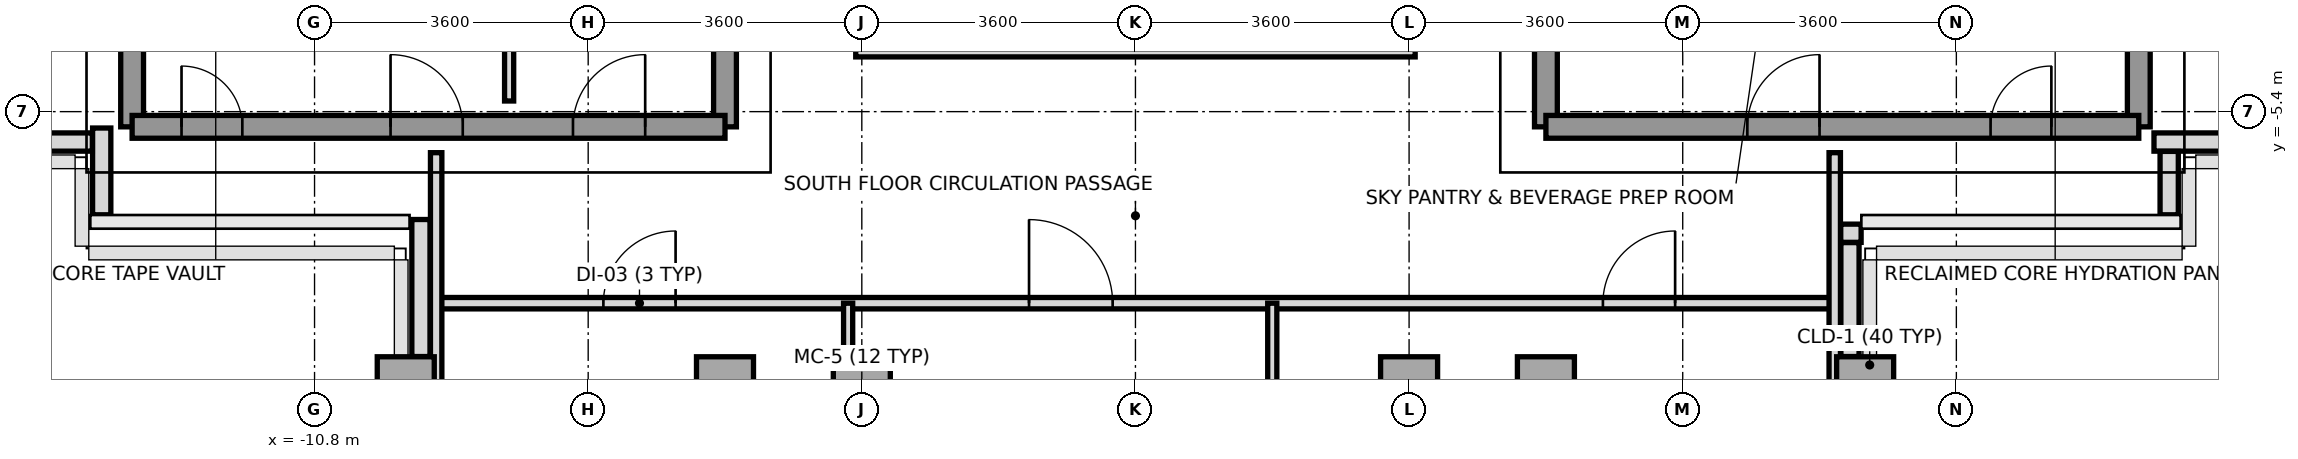
"""IFC4 building model, lengths in metres.
Left out: names, types, materials, properties, quantities, classifications, styles, units other than length and angle.
Written with IfcOpenShell. Run it as: python <this file> out.ifc"""

import sys

from ifc_helpers import new_model, si_unit, direction, frame, frame_2d, origin, origin_2d, place, context, subcontext, project, spatial, rectangle, extrude, source, transform, mapped, element, fill, save


model = new_model("IFC4")
c1 = context("Model", 3, precision=1e-05, world=origin(), true_north=direction((0.0, 1.0)))
c2 = subcontext(c1, "Body", "Model", "MODEL_VIEW")
j1 = project(units=[si_unit("LENGTHUNIT", "METRE"), si_unit("PLANEANGLEUNIT", "RADIAN")], contexts=[c1])
p1 = place(None, origin())
s1 = spatial("IfcSite", under=j1, at=p1, CompositionType="ELEMENT")
p2 = place(p1, origin())
s2 = spatial("IfcBuilding", under=s1, at=p2, CompositionType="ELEMENT")
p3 = place(p2, frame((0.0, 0.0, 255.6)))
s3 = spatial("IfcBuildingStorey", under=s2, at=p3, CompositionType="ELEMENT", Elevation=255.6)
m1 = source(origin(), c2, "Body", "SweptSolid", [
    extrude(rectangle(XDim=0.75, YDim=0.75, at=origin_2d()), origin(), (0.0, 0.0, 1.0), 3.01),
])
for number, where, z_axis, x_axis in (
    (1, (-9.6, -9.0, 0.0), (0.0, 0.0, 1.0), (1.0, 0.0, 0.0)),
    (2, (-5.4, -9.0, 0.0), (0.0, 0.0, 1.0), (1.0, 0.0, 0.0)),
    (3, (-3.6, -9.0, 0.0), (0.0, 0.0, 1.0), (1.0, 0.0, 0.0)),
    (4, (3.6, -9.0, 0.0), (0.0, 0.0, 1.0), (1.0, 0.0, 0.0)),
    (5, (5.4, -9.0, 0.0), (0.0, 0.0, 1.0), (1.0, 0.0, 0.0)),
    (6, (9.6, -9.0, 0.0), (0.0, 0.0, 1.0), (1.0, 0.0, 0.0)),
):
    element("IfcColumn", number, at=place(p3, frame(where, z_axis=z_axis, x_axis=x_axis)), inside=s3, PredefinedType="COLUMN", context=c2, shape_type="MappedRepresentation", body=[
        mapped(m1, transform((0.0, 0.0, 0.0), x_axis=(1.0, 0.0, 0.0), y_axis=(0.0, 1.0, 0.0), z_axis=(0.0, 0.0, 1.0), scale=1.0)),
    ])
p4 = place(p3, frame((14.677, -5.8, 0.0), z_axis=(0.0, 0.0, 1.0), x_axis=(-1.0, 0.0, 0.0)))
e7 = element("IfcWall", 7, at=p4, inside=s3, PredefinedType="PARAPET", context=c2, shape_type="SweptSolid", body=[
    extrude(rectangle(XDim=1.277, YDim=0.24, at=frame_2d((0.639, 0.0))), origin(), (0.0, 0.0, 1.0), 1.15),
])
p5 = place(p3, frame((13.6, -5.923, 0.0), z_axis=(0.0, 0.0, 1.0), x_axis=(0.0, -1.0, 0.0)))
e8 = element("IfcWall", 8, at=p5, inside=s3, PredefinedType="PARAPET", context=c2, shape_type="SweptSolid", body=[
    extrude(rectangle(XDim=0.834, YDim=0.24, at=frame_2d((0.417, 0.0))), origin(), (0.0, 0.0, 1.0), 1.15),
])
p6 = place(p3, frame((9.547, -7.0, 0.0), z_axis=(0.0, 0.0, 1.0), x_axis=(-1.0, 0.0, 0.0)))
e9 = element("IfcWall", 9, at=p6, inside=s3, PredefinedType="PARAPET", context=c2, shape_type="SweptSolid", body=[
    extrude(rectangle(XDim=0.269, YDim=0.24, at=frame_2d((0.135, 0.0))), origin(), (0.0, 0.0, 1.0), 1.15),
])
p7 = place(p3, frame((9.4, -7.123, 0.0), z_axis=(0.0, 0.0, 1.0), x_axis=(0.0, -1.0, 0.0)))
e10 = element("IfcWall", 10, at=p7, inside=s3, PredefinedType="PARAPET", context=c2, shape_type="SweptSolid", body=[
    extrude(rectangle(XDim=1.499, YDim=0.24, at=frame_2d((0.75, 0.0))), origin(), (0.0, 0.0, 1.0), 1.15),
])
p8 = place(p3, frame((-9.4, -8.622, 0.0), z_axis=(0.0, 0.0, 1.0), x_axis=(0.0, 1.0, 0.0)))
e11 = element("IfcWall", 11, at=p8, inside=s3, PredefinedType="PARAPET", context=c2, shape_type="SweptSolid", body=[
    extrude(rectangle(XDim=1.803, YDim=0.24, at=frame_2d((0.901, 0.0))), origin(), (0.0, 0.0, 1.0), 1.15),
])
p9 = place(p3, frame((-13.6, -6.757, 0.0), z_axis=(0.0, 0.0, 1.0), x_axis=(0.0, 1.0, 0.0)))
e12 = element("IfcWall", 12, at=p9, inside=s3, PredefinedType="PARAPET", context=c2, shape_type="SweptSolid", body=[
    extrude(rectangle(XDim=1.142, YDim=0.24, at=frame_2d((0.571, 0.0))), origin(), (0.0, 0.0, 1.0), 1.15),
])
p10 = place(p3, frame((-13.723, -5.8, 0.0), z_axis=(0.0, 0.0, 1.0), x_axis=(-1.0, 0.0, 0.0)))
e13 = element("IfcWall", 13, at=p10, inside=s3, PredefinedType="PARAPET", context=c2, shape_type="SweptSolid", body=[
    extrude(rectangle(XDim=1.077, YDim=0.24, at=frame_2d((0.539, 0.0))), origin(), (0.0, 0.0, 1.0), 1.15),
])
p11 = place(p3, frame((-13.2, -5.6, 0.0), z_axis=(0.0, 0.0, 1.0), x_axis=(0.0, 1.0, 0.0)))
e14 = element("IfcWall", 14, at=p11, inside=s3, PredefinedType="SHEAR", context=c2, shape_type="SweptSolid", body=[
    extrude(rectangle(XDim=11.2, YDim=0.3, at=frame_2d((5.6, 0.0))), origin(), (0.0, 0.0, 1.0), 3.01),
])
p12 = place(p3, frame((-5.4, -5.6, 0.0), z_axis=(0.0, 0.0, 1.0), x_axis=(0.0, 1.0, 0.0)))
e15 = element("IfcWall", 15, at=p12, inside=s3, PredefinedType="SHEAR", context=c2, shape_type="SweptSolid", body=[
    extrude(rectangle(XDim=12.5, YDim=0.3, at=frame_2d((6.25, 0.0))), origin(), (0.0, 0.0, 1.0), 3.01),
])
p13 = place(p12, frame((4.55, 0.0, 0.0)))
e16 = element("IfcOpeningElement", 16, at=p13, cuts=e15, PredefinedType="OPENING", context=c2, shape_type="SweptSolid", body=[
    extrude(rectangle(XDim=1.2, YDim=2.2, at=frame_2d((0.6, 1.1))), frame((0.0, 0.16, 0.0), z_axis=(0.0, -1.0, 0.0), x_axis=(1.0, 0.0, 0.0)), (0.0, 0.0, 1.0), 0.32),
])
p14 = place(p12, frame((10.45, 0.0, 0.0)))
e17 = element("IfcOpeningElement", 17, at=p14, cuts=e15, PredefinedType="OPENING", context=c2, shape_type="SweptSolid", body=[
    extrude(rectangle(XDim=1.2, YDim=2.2, at=frame_2d((0.6, 1.1))), frame((0.0, 0.16, 0.0), z_axis=(0.0, -1.0, 0.0), x_axis=(1.0, 0.0, 0.0)), (0.0, 0.0, 1.0), 0.32),
])
p15 = place(p12, frame((6.86, 0.0, 0.0)))
e18 = element("IfcOpeningElement", 18, at=p15, cuts=e15, PredefinedType="OPENING", context=c2, shape_type="SweptSolid", body=[
    extrude(rectangle(XDim=0.8, YDim=2.1, at=frame_2d((0.4, 1.05))), frame((0.0, 0.16, 0.0), z_axis=(0.0, -1.0, 0.0), x_axis=(1.0, 0.0, 0.0)), (0.0, 0.0, 1.0), 0.32),
])
p16 = place(p12, frame((7.88, 0.0, 0.0)))
e19 = element("IfcOpeningElement", 19, at=p16, cuts=e15, PredefinedType="OPENING", context=c2, shape_type="SweptSolid", body=[
    extrude(rectangle(XDim=0.8, YDim=2.1, at=frame_2d((0.4, 1.05))), frame((0.0, 0.16, 0.0), z_axis=(0.0, -1.0, 0.0), x_axis=(1.0, 0.0, 0.0)), (0.0, 0.0, 1.0), 0.32),
])
p17 = place(p3, frame((-13.2, -5.6, 0.0), z_axis=(0.0, 0.0, 1.0), x_axis=(1.0, 0.0, 0.0)))
e20 = element("IfcWall", 20, at=p17, inside=s3, PredefinedType="SHEAR", context=c2, shape_type="SweptSolid", body=[
    extrude(rectangle(XDim=7.8, YDim=0.3, at=frame_2d((3.9, 0.0))), origin(), (0.0, 0.0, 1.0), 3.01),
])
p18 = place(p17, frame((0.65, 0.0, 0.0)))
e21 = element("IfcOpeningElement", 21, at=p18, cuts=e20, PredefinedType="OPENING", context=c2, shape_type="SweptSolid", body=[
    extrude(rectangle(XDim=0.8, YDim=2.1, at=frame_2d((0.4, 1.05))), frame((0.0, 0.16, 0.0), z_axis=(0.0, -1.0, 0.0), x_axis=(1.0, 0.0, 0.0)), (0.0, 0.0, 1.0), 0.32),
])
p19 = place(p17, frame((3.4, 0.0, 0.0)))
e22 = element("IfcOpeningElement", 22, at=p19, cuts=e20, PredefinedType="OPENING", context=c2, shape_type="SweptSolid", body=[
    extrude(rectangle(XDim=0.95, YDim=2.15, at=frame_2d((0.475, 1.075))), frame((0.0, 0.16, 0.0), z_axis=(0.0, -1.0, 0.0), x_axis=(1.0, 0.0, 0.0)), (0.0, 0.0, 1.0), 0.32),
])
p20 = place(p17, frame((5.8, 0.0, 0.0)))
e23 = element("IfcOpeningElement", 23, at=p20, cuts=e20, PredefinedType="OPENING", context=c2, shape_type="SweptSolid", body=[
    extrude(rectangle(XDim=0.95, YDim=2.15, at=frame_2d((0.475, 1.075))), frame((0.0, 0.16, 0.0), z_axis=(0.0, -1.0, 0.0), x_axis=(1.0, 0.0, 0.0)), (0.0, 0.0, 1.0), 0.32),
])
p21 = place(p3, frame((13.2, -5.6, 0.0), z_axis=(0.0, 0.0, 1.0), x_axis=(0.0, 1.0, 0.0)))
e24 = element("IfcWall", 24, at=p21, inside=s3, PredefinedType="SHEAR", context=c2, shape_type="SweptSolid", body=[
    extrude(rectangle(XDim=11.2, YDim=0.3, at=frame_2d((5.6, 0.0))), origin(), (0.0, 0.0, 1.0), 3.01),
])
p22 = place(p3, frame((5.4, -5.6, 0.0), z_axis=(0.0, 0.0, 1.0), x_axis=(0.0, 1.0, 0.0)))
e25 = element("IfcWall", 25, at=p22, inside=s3, PredefinedType="SHEAR", context=c2, shape_type="SweptSolid", body=[
    extrude(rectangle(XDim=12.5, YDim=0.3, at=frame_2d((6.25, 0.0))), origin(), (0.0, 0.0, 1.0), 3.01),
])
p23 = place(p22, frame((4.55, 0.0, 0.0)))
e26 = element("IfcOpeningElement", 26, at=p23, cuts=e25, PredefinedType="OPENING", context=c2, shape_type="SweptSolid", body=[
    extrude(rectangle(XDim=1.2, YDim=2.2, at=frame_2d((0.6, 1.1))), frame((0.0, 0.16, 0.0), z_axis=(0.0, -1.0, 0.0), x_axis=(1.0, 0.0, 0.0)), (0.0, 0.0, 1.0), 0.32),
])
p24 = place(p22, frame((10.45, 0.0, 0.0)))
e27 = element("IfcOpeningElement", 27, at=p24, cuts=e25, PredefinedType="OPENING", context=c2, shape_type="SweptSolid", body=[
    extrude(rectangle(XDim=1.2, YDim=2.2, at=frame_2d((0.6, 1.1))), frame((0.0, 0.16, 0.0), z_axis=(0.0, -1.0, 0.0), x_axis=(1.0, 0.0, 0.0)), (0.0, 0.0, 1.0), 0.32),
])
p25 = place(p3, frame((5.4, -5.6, 0.0), z_axis=(0.0, 0.0, 1.0), x_axis=(1.0, 0.0, 0.0)))
e28 = element("IfcWall", 28, at=p25, inside=s3, PredefinedType="SHEAR", context=c2, shape_type="SweptSolid", body=[
    extrude(rectangle(XDim=7.8, YDim=0.3, at=frame_2d((3.9, 0.0))), origin(), (0.0, 0.0, 1.0), 3.01),
])
p26 = place(p25, frame((5.85, 0.0, 0.0)))
e29 = element("IfcOpeningElement", 29, at=p26, cuts=e28, PredefinedType="OPENING", context=c2, shape_type="SweptSolid", body=[
    extrude(rectangle(XDim=0.8, YDim=2.1, at=frame_2d((0.4, 1.05))), frame((0.0, 0.16, 0.0), z_axis=(0.0, -1.0, 0.0), x_axis=(1.0, 0.0, 0.0)), (0.0, 0.0, 1.0), 0.32),
])
p27 = place(p25, frame((2.65, 0.0, 0.0)))
e30 = element("IfcOpeningElement", 30, at=p27, cuts=e28, PredefinedType="OPENING", context=c2, shape_type="SweptSolid", body=[
    extrude(rectangle(XDim=0.95, YDim=2.15, at=frame_2d((0.475, 1.075))), frame((0.0, 0.16, 0.0), z_axis=(0.0, -1.0, 0.0), x_axis=(1.0, 0.0, 0.0)), (0.0, 0.0, 1.0), 0.32),
])
p28 = place(p3, frame((-8.24, -5.26, 0.0), z_axis=(0.0, 0.0, 1.0), x_axis=(0.0, 1.0, 0.0)))
e31 = element("IfcWall", 31, at=p28, inside=s3, PredefinedType="PARTITIONING", context=c2, shape_type="SweptSolid", body=[
    extrude(rectangle(XDim=2.94, YDim=0.12, at=frame_2d((1.47, 0.0))), origin(), (0.0, 0.0, 1.0), 3.01),
])
p29 = place(p3, frame((-9.2, -7.92, 0.0), z_axis=(0.0, 0.0, 1.0), x_axis=(1.0, 0.0, 0.0)))
e32 = element("IfcWall", 32, at=p29, inside=s3, PredefinedType="PARTITIONING", context=c2, shape_type="SweptSolid", body=[
    extrude(rectangle(XDim=18.4, YDim=0.15, at=frame_2d((9.2, 0.0))), origin(), (0.0, 0.0, 1.0), 2.57),
])
p30 = place(p29, frame((2.2, 0.0, 0.0)))
e33 = element("IfcOpeningElement", 33, at=p30, cuts=e32, PredefinedType="OPENING", context=c2, shape_type="SweptSolid", body=[
    extrude(rectangle(XDim=0.95, YDim=2.15, at=frame_2d((0.475, 1.075))), frame((0.0, 0.085, 0.0), z_axis=(0.0, -1.0, 0.0), x_axis=(1.0, 0.0, 0.0)), (0.0, 0.0, 1.0), 0.17),
])
p31 = place(p29, frame((7.8, 0.0, 0.0)))
e34 = element("IfcOpeningElement", 34, at=p31, cuts=e32, PredefinedType="OPENING", context=c2, shape_type="SweptSolid", body=[
    extrude(rectangle(XDim=1.1, YDim=2.2, at=frame_2d((0.55, 1.1))), frame((0.0, 0.085, 0.0), z_axis=(0.0, -1.0, 0.0), x_axis=(1.0, 0.0, 0.0)), (0.0, 0.0, 1.0), 0.17),
])
p32 = place(p29, frame((15.35, 0.0, 0.0)))
e35 = element("IfcOpeningElement", 35, at=p32, cuts=e32, PredefinedType="OPENING", context=c2, shape_type="SweptSolid", body=[
    extrude(rectangle(XDim=0.95, YDim=2.15, at=frame_2d((0.475, 1.075))), frame((0.0, 0.085, 0.0), z_axis=(0.0, -1.0, 0.0), x_axis=(1.0, 0.0, 0.0)), (0.0, 0.0, 1.0), 0.17),
])
for number, where, z_axis, x_axis in (
    (36, (-9.2, -10.28, 0.0), (0.0, 0.0, 1.0), (0.0, 1.0, 0.0)),
    (37, (9.2, -10.28, 0.0), (0.0, 0.0, 1.0), (0.0, 1.0, 0.0)),
):
    element("IfcWall", number, at=place(p3, frame(where, z_axis=z_axis, x_axis=x_axis)), inside=s3, PredefinedType="PARTITIONING", context=c2, shape_type="SweptSolid", body=[
        extrude(rectangle(XDim=4.34, YDim=0.15, at=frame_2d((2.17, 0.0))), origin(), (0.0, 0.0, 1.0), 2.61),
    ])
p33 = place(p3, frame((-3.78, -19.25, 0.0), z_axis=(0.0, 0.0, 1.0), x_axis=(0.0, 1.0, 0.0)))
e38 = element("IfcWall", 38, at=p33, inside=s3, PredefinedType="PARTITIONING", context=c2, shape_type="SweptSolid", body=[
    extrude(rectangle(XDim=11.33, YDim=0.12, at=frame_2d((5.665, 0.0))), origin(), (0.0, 0.0, 1.0), 2.57),
])
p34 = place(p3, frame((1.8, -19.25, 0.0), z_axis=(0.0, 0.0, 1.0), x_axis=(0.0, 1.0, 0.0)))
e39 = element("IfcWall", 39, at=p34, inside=s3, PredefinedType="PARTITIONING", context=c2, shape_type="SweptSolid", body=[
    extrude(rectangle(XDim=11.33, YDim=0.12, at=frame_2d((5.665, 0.0))), origin(), (0.0, 0.0, 1.0), 2.61),
])
p35 = place(p3, frame((-3.68, -4.56, 0.0), z_axis=(0.0, 0.0, 1.0), x_axis=(1.0, 0.0, 0.0)))
e40 = element("IfcWall", 40, at=p35, inside=s3, PredefinedType="PARAPET", context=c2, shape_type="SweptSolid", body=[
    extrude(rectangle(XDim=7.36, YDim=0.24, at=frame_2d((3.68, 0.0))), origin(), (0.0, 0.0, 1.0), 1.15),
])
m2 = source(origin(), c2, "Body", "SweptSolid", [
    extrude(rectangle(XDim=0.8, YDim=2.1, at=frame_2d((0.4, 1.05))), frame((0.0, 0.025, 0.0), z_axis=(0.0, -1.0, 0.0), x_axis=(1.0, 0.0, 0.0)), (0.0, 0.0, 1.0), 0.05),
])
p36 = place(p18, origin())
e41 = element("IfcDoor", 41, at=p36, inside=s3, OperationType="SINGLE_SWING_LEFT", PredefinedType="DOOR", context=c2, shape_type="MappedRepresentation", body=[
    mapped(m2, transform((0.0, 0.0, 0.0), x_axis=(1.0, 0.0, 0.0), y_axis=(0.0, 1.0, 0.0), z_axis=(0.0, 0.0, 1.0), scale=1.0)),
])
fill(e21, e41)
p37 = place(p26, origin())
e42 = element("IfcDoor", 42, at=p37, inside=s3, OperationType="SINGLE_SWING_RIGHT", PredefinedType="DOOR", context=c2, shape_type="MappedRepresentation", body=[
    mapped(m2, transform((0.0, 0.0, 0.0), x_axis=(1.0, 0.0, 0.0), y_axis=(0.0, 1.0, 0.0), z_axis=(0.0, 0.0, 1.0), scale=1.0)),
])
fill(e29, e42)
m3 = source(origin(), c2, "Body", "SweptSolid", [
    extrude(rectangle(XDim=0.95, YDim=2.15, at=frame_2d((0.475, 1.075))), frame((0.0, 0.025, 0.0), z_axis=(0.0, -1.0, 0.0), x_axis=(1.0, 0.0, 0.0)), (0.0, 0.0, 1.0), 0.05),
])
p38 = place(p19, origin())
e43 = element("IfcDoor", 43, at=p38, inside=s3, OperationType="SINGLE_SWING_LEFT", PredefinedType="DOOR", context=c2, shape_type="MappedRepresentation", body=[
    mapped(m3, transform((0.0, 0.0, 0.0), x_axis=(1.0, 0.0, 0.0), y_axis=(0.0, 1.0, 0.0), z_axis=(0.0, 0.0, 1.0), scale=1.0)),
])
fill(e22, e43)
p39 = place(p20, origin())
e44 = element("IfcDoor", 44, at=p39, inside=s3, OperationType="SINGLE_SWING_RIGHT", PredefinedType="DOOR", context=c2, shape_type="MappedRepresentation", body=[
    mapped(m3, transform((0.0, 0.0, 0.0), x_axis=(1.0, 0.0, 0.0), y_axis=(0.0, 1.0, 0.0), z_axis=(0.0, 0.0, 1.0), scale=1.0)),
])
fill(e23, e44)
p40 = place(p27, origin())
e45 = element("IfcDoor", 45, at=p40, inside=s3, OperationType="SINGLE_SWING_RIGHT", PredefinedType="DOOR", context=c2, shape_type="MappedRepresentation", body=[
    mapped(m3, transform((0.0, 0.0, 0.0), x_axis=(1.0, 0.0, 0.0), y_axis=(0.0, 1.0, 0.0), z_axis=(0.0, 0.0, 1.0), scale=1.0)),
])
fill(e30, e45)
p41 = place(p30, origin())
e46 = element("IfcDoor", 46, at=p41, inside=s3, OperationType="SINGLE_SWING_RIGHT", PredefinedType="DOOR", context=c2, shape_type="MappedRepresentation", body=[
    mapped(m3, transform((0.0, 0.0, 0.0), x_axis=(1.0, 0.0, 0.0), y_axis=(0.0, 1.0, 0.0), z_axis=(0.0, 0.0, 1.0), scale=1.0)),
])
fill(e33, e46)
m4 = source(origin(), c2, "Body", "SweptSolid", [
    extrude(rectangle(XDim=1.1, YDim=2.2, at=frame_2d((0.55, 1.1))), frame((0.0, 0.025, 0.0), z_axis=(0.0, -1.0, 0.0), x_axis=(1.0, 0.0, 0.0)), (0.0, 0.0, 1.0), 0.05),
])
p42 = place(p31, origin())
e47 = element("IfcDoor", 47, at=p42, inside=s3, OperationType="SINGLE_SWING_LEFT", PredefinedType="DOOR", context=c2, shape_type="MappedRepresentation", body=[
    mapped(m4, transform((0.0, 0.0, 0.0), x_axis=(1.0, 0.0, 0.0), y_axis=(0.0, 1.0, 0.0), z_axis=(0.0, 0.0, 1.0), scale=1.0)),
])
fill(e34, e47)
p43 = place(p32, origin())
e48 = element("IfcDoor", 48, at=p43, inside=s3, OperationType="SINGLE_SWING_RIGHT", PredefinedType="DOOR", context=c2, shape_type="MappedRepresentation", body=[
    mapped(m3, transform((0.0, 0.0, 0.0), x_axis=(1.0, 0.0, 0.0), y_axis=(0.0, 1.0, 0.0), z_axis=(0.0, 0.0, 1.0), scale=1.0)),
])
fill(e35, e48)
save(model, sys.argv[1])
